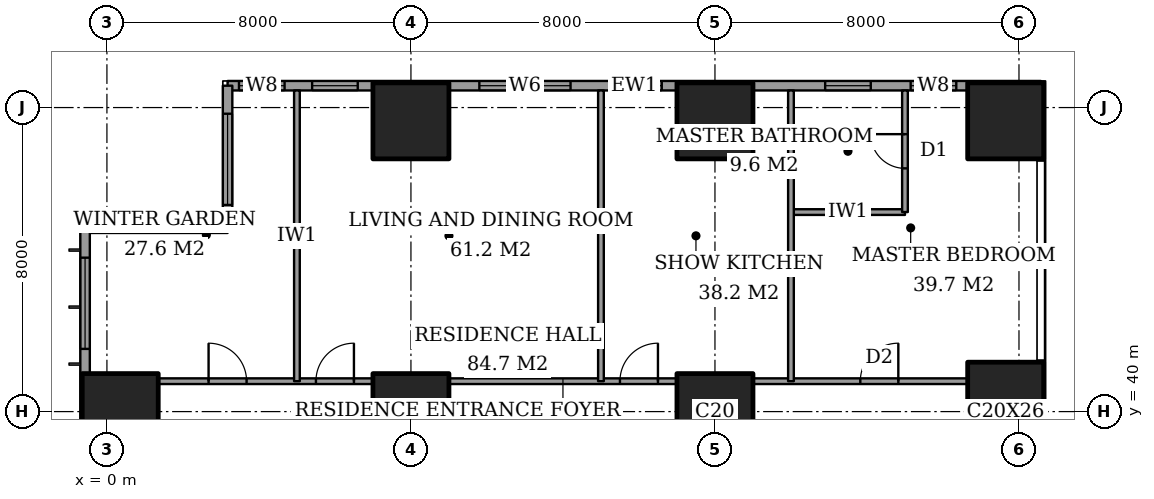
"""IFC4 building model, lengths in metres.
Left out: names, types, materials, properties, quantities, classifications, styles, units other than length and angle.
Written with IfcOpenShell. Run it as: python <this file> out.ifc"""

import sys

from ifc_helpers import new_model, si_unit, direction, frame, frame_2d, origin, origin_2d, place, context, subcontext, project, spatial, rectangle, extrude, element, fill, save


model = new_model("IFC4")
c1 = context("Model", 3, precision=1e-05, world=origin(), true_north=direction((0.0, 1.0)))
c2 = subcontext(c1, "Body", "Model", "MODEL_VIEW")
j1 = project(units=[si_unit("LENGTHUNIT", "METRE"), si_unit("PLANEANGLEUNIT", "RADIAN")], contexts=[c1])
p1 = place(None, origin())
s1 = spatial("IfcSite", under=j1, at=p1, CompositionType="ELEMENT")
p2 = place(p1, origin())
s2 = spatial("IfcBuilding", under=s1, at=p2, CompositionType="ELEMENT")
p3 = place(p2, frame((0.0, 0.0, 47.6)))
s3 = spatial("IfcBuildingStorey", under=s2, at=p3, CompositionType="ELEMENT", Elevation=47.6)
for number, where, z_axis, x_axis in (
    (1, (0.35, 40.0, 0.0), (0.0, 0.0, 1.0), (1.0, 0.0, 0.0)),
    (2, (8.0, 40.0, 0.0), (0.0, 0.0, 1.0), (1.0, 0.0, 0.0)),
    (3, (8.0, 47.65, 0.0), (0.0, 0.0, 1.0), (1.0, 0.0, 0.0)),
    (4, (16.0, 40.0, 0.0), (0.0, 0.0, 1.0), (1.0, 0.0, 0.0)),
    (5, (16.0, 47.65, 0.0), (0.0, 0.0, 1.0), (1.0, 0.0, 0.0)),
):
    element("IfcColumn", number, at=place(p3, frame(where, z_axis=z_axis, x_axis=x_axis)), inside=s3, PredefinedType="COLUMN", context=c2, shape_type="SweptSolid", body=[
        extrude(rectangle(XDim=2.0, YDim=2.0, at=origin_2d()), origin(), (0.0, 0.0, 1.0), 3.6),
    ])
p4 = place(p3, frame((23.65, 40.0, 0.0), z_axis=(0.0, 0.0, 1.0), x_axis=(1.0, 0.0, 0.0)))
e6 = element("IfcColumn", 6, at=p4, inside=s3, PredefinedType="COLUMN", context=c2, shape_type="SweptSolid", body=[
    extrude(rectangle(XDim=2.0, YDim=2.6, at=origin_2d()), origin(), (0.0, 0.0, 1.0), 3.6),
])
p5 = place(p3, frame((23.65, 47.65, 0.0), z_axis=(0.0, 0.0, 1.0), x_axis=(1.0, 0.0, 0.0)))
e7 = element("IfcColumn", 7, at=p5, inside=s3, PredefinedType="COLUMN", context=c2, shape_type="SweptSolid", body=[
    extrude(rectangle(XDim=2.0, YDim=2.0, at=origin_2d()), origin(), (0.0, 0.0, 1.0), 3.6),
])
p6 = place(p3, frame((24.575, 48.575, 0.0), z_axis=(0.0, 0.0, 1.0), x_axis=(-1.0, 0.0, 0.0)))
e8 = element("IfcWall", 8, at=p6, inside=s3, PredefinedType="SOLIDWALL", context=c2, shape_type="SweptSolid", body=[
    extrude(rectangle(XDim=21.4, YDim=0.25, at=frame_2d((10.7, 0.0))), origin(), (0.0, 0.0, 1.0), 3.6),
])
p7 = place(p6, frame((2.225, 0.0, 0.6)))
e9 = element("IfcOpeningElement", 9, at=p7, cuts=e8, PredefinedType="OPENING", context=c2, shape_type="SweptSolid", body=[
    extrude(rectangle(XDim=1.2, YDim=2.0, at=frame_2d((0.6, 1.0))), frame((0.0, 0.135, 0.0), z_axis=(0.0, -1.0, 0.0), x_axis=(1.0, 0.0, 0.0)), (0.0, 0.0, 1.0), 0.27),
])
p8 = place(p6, frame((4.475, 0.0, 0.6)))
e10 = element("IfcOpeningElement", 10, at=p8, cuts=e8, PredefinedType="OPENING", context=c2, shape_type="SweptSolid", body=[
    extrude(rectangle(XDim=1.2, YDim=2.0, at=frame_2d((0.6, 1.0))), frame((0.0, 0.135, 0.0), z_axis=(0.0, -1.0, 0.0), x_axis=(1.0, 0.0, 0.0)), (0.0, 0.0, 1.0), 0.27),
])
p9 = place(p6, frame((9.975, 0.0, 0.6)))
e11 = element("IfcOpeningElement", 11, at=p9, cuts=e8, PredefinedType="OPENING", context=c2, shape_type="SweptSolid", body=[
    extrude(rectangle(XDim=1.2, YDim=2.0, at=frame_2d((0.6, 1.0))), frame((0.0, 0.135, 0.0), z_axis=(0.0, -1.0, 0.0), x_axis=(1.0, 0.0, 0.0)), (0.0, 0.0, 1.0), 0.27),
])
p10 = place(p6, frame((12.375, 0.0, 0.6)))
e12 = element("IfcOpeningElement", 12, at=p10, cuts=e8, PredefinedType="OPENING", context=c2, shape_type="SweptSolid", body=[
    extrude(rectangle(XDim=2.4, YDim=2.0, at=frame_2d((1.2, 1.0))), frame((0.0, 0.135, 0.0), z_axis=(0.0, -1.0, 0.0), x_axis=(1.0, 0.0, 0.0)), (0.0, 0.0, 1.0), 0.27),
])
p11 = place(p6, frame((17.975, 0.0, 0.6)))
e13 = element("IfcOpeningElement", 13, at=p11, cuts=e8, PredefinedType="OPENING", context=c2, shape_type="SweptSolid", body=[
    extrude(rectangle(XDim=1.2, YDim=2.0, at=frame_2d((0.6, 1.0))), frame((0.0, 0.135, 0.0), z_axis=(0.0, -1.0, 0.0), x_axis=(1.0, 0.0, 0.0)), (0.0, 0.0, 1.0), 0.27),
])
p12 = place(p6, frame((19.9, 0.0, 0.6)))
e14 = element("IfcOpeningElement", 14, at=p12, cuts=e8, PredefinedType="OPENING", context=c2, shape_type="SweptSolid", body=[
    extrude(rectangle(XDim=1.2, YDim=2.0, at=frame_2d((0.6, 1.0))), frame((0.0, 0.135, 0.0), z_axis=(0.0, -1.0, 0.0), x_axis=(1.0, 0.0, 0.0)), (0.0, 0.0, 1.0), 0.27),
])
p13 = place(p3, frame((3.175, 48.575, 0.0), z_axis=(0.0, 0.0, 1.0), x_axis=(0.0, -1.0, 0.0)))
e15 = element("IfcWall", 15, at=p13, inside=s3, PredefinedType="SOLIDWALL", context=c2, shape_type="SweptSolid", body=[
    extrude(rectangle(XDim=3.75, YDim=0.25, at=frame_2d((1.875, 0.0))), origin(), (0.0, 0.0, 1.0), 3.6),
])
p14 = place(p13, frame((0.738, 0.0, 0.6)))
e16 = element("IfcOpeningElement", 16, at=p14, cuts=e15, PredefinedType="OPENING", context=c2, shape_type="SweptSolid", body=[
    extrude(rectangle(XDim=2.4, YDim=2.0, at=frame_2d((1.2, 1.0))), frame((0.0, 0.135, 0.0), z_axis=(0.0, -1.0, 0.0), x_axis=(1.0, 0.0, 0.0)), (0.0, 0.0, 1.0), 0.27),
])
p15 = place(p3, frame((3.175, 44.825, 0.0), z_axis=(0.0, 0.0, 1.0), x_axis=(-1.0, 0.0, 0.0)))
e17 = element("IfcWall", 17, at=p15, inside=s3, PredefinedType="SOLIDWALL", context=c2, shape_type="SweptSolid", body=[
    extrude(rectangle(XDim=3.75, YDim=0.25, at=frame_2d((1.875, 0.0))), origin(), (0.0, 0.0, 1.0), 3.6),
])
p16 = place(p15, frame((0.613, 0.0, 0.6)))
e18 = element("IfcOpeningElement", 18, at=p16, cuts=e17, PredefinedType="OPENING", context=c2, shape_type="SweptSolid", body=[
    extrude(rectangle(XDim=2.4, YDim=2.0, at=frame_2d((1.2, 1.0))), frame((0.0, 0.135, 0.0), z_axis=(0.0, -1.0, 0.0), x_axis=(1.0, 0.0, 0.0)), (0.0, 0.0, 1.0), 0.27),
])
p17 = place(p3, frame((-0.575, 44.825, 0.0), z_axis=(0.0, 0.0, 1.0), x_axis=(0.0, -1.0, 0.0)))
e19 = element("IfcWall", 19, at=p17, inside=s3, PredefinedType="SOLIDWALL", context=c2, shape_type="SweptSolid", body=[
    extrude(rectangle(XDim=41.65, YDim=0.25, at=frame_2d((20.825, 0.0))), origin(), (0.0, 0.0, 1.0), 3.6),
])
p18 = place(p17, frame((0.775, 0.0, 0.6)))
e20 = element("IfcOpeningElement", 20, at=p18, cuts=e19, PredefinedType="OPENING", context=c2, shape_type="SweptSolid", body=[
    extrude(rectangle(XDim=2.4, YDim=2.0, at=frame_2d((1.2, 1.0))), frame((0.0, 0.135, 0.0), z_axis=(0.0, -1.0, 0.0), x_axis=(1.0, 0.0, 0.0)), (0.0, 0.0, 1.0), 0.27),
])
p19 = place(p17, frame((6.1, 0.0, 0.6)))
e21 = element("IfcOpeningElement", 21, at=p19, cuts=e19, PredefinedType="OPENING", context=c2, shape_type="SweptSolid", body=[
    extrude(rectangle(XDim=1.2, YDim=2.0, at=frame_2d((0.6, 1.0))), frame((0.0, 0.135, 0.0), z_axis=(0.0, -1.0, 0.0), x_axis=(1.0, 0.0, 0.0)), (0.0, 0.0, 1.0), 0.27),
])
p20 = place(p17, frame((8.425, 0.0, 0.6)))
e22 = element("IfcOpeningElement", 22, at=p20, cuts=e19, PredefinedType="OPENING", context=c2, shape_type="SweptSolid", body=[
    extrude(rectangle(XDim=2.4, YDim=2.0, at=frame_2d((1.2, 1.0))), frame((0.0, 0.135, 0.0), z_axis=(0.0, -1.0, 0.0), x_axis=(1.0, 0.0, 0.0)), (0.0, 0.0, 1.0), 0.27),
])
p21 = place(p17, frame((15.625, 0.0, 0.6)))
e23 = element("IfcOpeningElement", 23, at=p21, cuts=e19, PredefinedType="OPENING", context=c2, shape_type="SweptSolid", body=[
    extrude(rectangle(XDim=2.4, YDim=2.0, at=frame_2d((1.2, 1.0))), frame((0.0, 0.135, 0.0), z_axis=(0.0, -1.0, 0.0), x_axis=(1.0, 0.0, 0.0)), (0.0, 0.0, 1.0), 0.27),
])
p22 = place(p17, frame((23.625, 0.0, 0.6)))
e24 = element("IfcOpeningElement", 24, at=p22, cuts=e19, PredefinedType="OPENING", context=c2, shape_type="SweptSolid", body=[
    extrude(rectangle(XDim=2.4, YDim=2.0, at=frame_2d((1.2, 1.0))), frame((0.0, 0.135, 0.0), z_axis=(0.0, -1.0, 0.0), x_axis=(1.0, 0.0, 0.0)), (0.0, 0.0, 1.0), 0.27),
])
p23 = place(p17, frame((30.825, 0.0, 0.6)))
e25 = element("IfcOpeningElement", 25, at=p23, cuts=e19, PredefinedType="OPENING", context=c2, shape_type="SweptSolid", body=[
    extrude(rectangle(XDim=2.4, YDim=2.0, at=frame_2d((1.2, 1.0))), frame((0.0, 0.135, 0.0), z_axis=(0.0, -1.0, 0.0), x_axis=(1.0, 0.0, 0.0)), (0.0, 0.0, 1.0), 0.27),
])
p24 = place(p17, frame((34.5, 0.0, 0.6)))
e26 = element("IfcOpeningElement", 26, at=p24, cuts=e19, PredefinedType="OPENING", context=c2, shape_type="SweptSolid", body=[
    extrude(rectangle(XDim=1.2, YDim=2.0, at=frame_2d((0.6, 1.0))), frame((0.0, 0.135, 0.0), z_axis=(0.0, -1.0, 0.0), x_axis=(1.0, 0.0, 0.0)), (0.0, 0.0, 1.0), 0.27),
])
p25 = place(p17, frame((38.475, 0.0, 0.6)))
e27 = element("IfcOpeningElement", 27, at=p25, cuts=e19, PredefinedType="OPENING", context=c2, shape_type="SweptSolid", body=[
    extrude(rectangle(XDim=2.4, YDim=2.0, at=frame_2d((1.2, 1.0))), frame((0.0, 0.135, 0.0), z_axis=(0.0, -1.0, 0.0), x_axis=(1.0, 0.0, 0.0)), (0.0, 0.0, 1.0), 0.27),
])
p26 = place(p3, frame((1.35, 40.8, 0.0), z_axis=(0.0, 0.0, 1.0), x_axis=(1.0, 0.0, 0.0)))
e28 = element("IfcWall", 28, at=p26, inside=s3, PredefinedType="PARTITIONING", context=c2, shape_type="SweptSolid", body=[
    extrude(rectangle(XDim=5.65, YDim=0.15, at=frame_2d((2.825, 0.0))), origin(), (0.0, 0.0, 1.0), 3.35),
])
p27 = place(p26, frame((1.325, 0.0, 0.0)))
e29 = element("IfcOpeningElement", 29, at=p27, cuts=e28, PredefinedType="OPENING", context=c2, shape_type="SweptSolid", body=[
    extrude(rectangle(XDim=1.0, YDim=2.1, at=frame_2d((0.5, 1.05))), frame((0.0, 0.085, 0.0), z_axis=(0.0, -1.0, 0.0), x_axis=(1.0, 0.0, 0.0)), (0.0, 0.0, 1.0), 0.17),
])
p28 = place(p26, frame((4.15, 0.0, 0.0)))
e30 = element("IfcOpeningElement", 30, at=p28, cuts=e28, PredefinedType="OPENING", context=c2, shape_type="SweptSolid", body=[
    extrude(rectangle(XDim=1.0, YDim=2.1, at=frame_2d((0.5, 1.05))), frame((0.0, 0.085, 0.0), z_axis=(0.0, -1.0, 0.0), x_axis=(1.0, 0.0, 0.0)), (0.0, 0.0, 1.0), 0.17),
])
p29 = place(p3, frame((9.0, 40.8, 0.0), z_axis=(0.0, 0.0, 1.0), x_axis=(1.0, 0.0, 0.0)))
e31 = element("IfcWall", 31, at=p29, inside=s3, PredefinedType="PARTITIONING", context=c2, shape_type="SweptSolid", body=[
    extrude(rectangle(XDim=6.0, YDim=0.15, at=frame_2d((3.0, 0.0))), origin(), (0.0, 0.0, 1.0), 3.35),
])
p30 = place(p29, frame((4.5, 0.0, 0.0)))
e32 = element("IfcOpeningElement", 32, at=p30, cuts=e31, PredefinedType="OPENING", context=c2, shape_type="SweptSolid", body=[
    extrude(rectangle(XDim=1.0, YDim=2.1, at=frame_2d((0.5, 1.05))), frame((0.0, 0.085, 0.0), z_axis=(0.0, -1.0, 0.0), x_axis=(1.0, 0.0, 0.0)), (0.0, 0.0, 1.0), 0.17),
])
p31 = place(p3, frame((17.0, 40.8, 0.0), z_axis=(0.0, 0.0, 1.0), x_axis=(1.0, 0.0, 0.0)))
e33 = element("IfcWall", 33, at=p31, inside=s3, PredefinedType="PARTITIONING", context=c2, shape_type="SweptSolid", body=[
    extrude(rectangle(XDim=5.65, YDim=0.15, at=frame_2d((2.825, 0.0))), origin(), (0.0, 0.0, 1.0), 3.35),
])
p32 = place(p31, frame((2.825, 0.0, 0.0)))
e34 = element("IfcOpeningElement", 34, at=p32, cuts=e33, PredefinedType="OPENING", context=c2, shape_type="SweptSolid", body=[
    extrude(rectangle(XDim=1.0, YDim=2.1, at=frame_2d((0.5, 1.05))), frame((0.0, 0.085, 0.0), z_axis=(0.0, -1.0, 0.0), x_axis=(1.0, 0.0, 0.0)), (0.0, 0.0, 1.0), 0.17),
])
p33 = place(p3, frame((18.0, 45.25, 0.0), z_axis=(0.0, 0.0, 1.0), x_axis=(1.0, 0.0, 0.0)))
e35 = element("IfcWall", 35, at=p33, inside=s3, PredefinedType="PARTITIONING", context=c2, shape_type="SweptSolid", body=[
    extrude(rectangle(XDim=3.0, YDim=0.15, at=frame_2d((1.5, 0.0))), origin(), (0.0, 0.0, 1.0), 3.35),
])
for number, where, z_axis, x_axis in (
    (36, (5.0, 40.8, 0.0), (0.0, 0.0, 1.0), (0.0, 1.0, 0.0)),
    (37, (13.0, 40.8, 0.0), (0.0, 0.0, 1.0), (0.0, 1.0, 0.0)),
    (38, (18.0, 40.8, 0.0), (0.0, 0.0, 1.0), (0.0, 1.0, 0.0)),
):
    element("IfcWall", number, at=place(p3, frame(where, z_axis=z_axis, x_axis=x_axis)), inside=s3, PredefinedType="PARTITIONING", context=c2, shape_type="SweptSolid", body=[
        extrude(rectangle(XDim=7.65, YDim=0.15, at=frame_2d((3.825, 0.0))), origin(), (0.0, 0.0, 1.0), 3.35),
    ])
p34 = place(p3, frame((21.0, 45.25, 0.0), z_axis=(0.0, 0.0, 1.0), x_axis=(0.0, 1.0, 0.0)))
e39 = element("IfcWall", 39, at=p34, inside=s3, PredefinedType="PARTITIONING", context=c2, shape_type="SweptSolid", body=[
    extrude(rectangle(XDim=3.2, YDim=0.15, at=frame_2d((1.6, 0.0))), origin(), (0.0, 0.0, 1.0), 3.35),
])
p35 = place(p34, frame((1.15, 0.0, 0.0)))
e40 = element("IfcOpeningElement", 40, at=p35, cuts=e39, PredefinedType="OPENING", context=c2, shape_type="SweptSolid", body=[
    extrude(rectangle(XDim=0.9, YDim=2.1, at=frame_2d((0.45, 1.05))), frame((0.0, 0.085, 0.0), z_axis=(0.0, -1.0, 0.0), x_axis=(1.0, 0.0, 0.0)), (0.0, 0.0, 1.0), 0.17),
])
p36 = place(p7, origin())
e41 = element("IfcWindow", 41, at=p36, inside=s3, PartitioningType="SINGLE_PANEL", PredefinedType="WINDOW", context=c2, shape_type="SweptSolid", body=[
    extrude(rectangle(XDim=1.2, YDim=2.0, at=frame_2d((0.6, 1.0))), frame((0.0, 0.03, 0.0), z_axis=(0.0, -1.0, 0.0), x_axis=(1.0, 0.0, 0.0)), (0.0, 0.0, 1.0), 0.06),
])
fill(e9, e41)
p37 = place(p8, origin())
e42 = element("IfcWindow", 42, at=p37, inside=s3, PartitioningType="SINGLE_PANEL", PredefinedType="WINDOW", context=c2, shape_type="SweptSolid", body=[
    extrude(rectangle(XDim=1.2, YDim=2.0, at=frame_2d((0.6, 1.0))), frame((0.0, 0.03, 0.0), z_axis=(0.0, -1.0, 0.0), x_axis=(1.0, 0.0, 0.0)), (0.0, 0.0, 1.0), 0.06),
])
fill(e10, e42)
p38 = place(p9, origin())
e43 = element("IfcWindow", 43, at=p38, inside=s3, PartitioningType="SINGLE_PANEL", PredefinedType="WINDOW", context=c2, shape_type="SweptSolid", body=[
    extrude(rectangle(XDim=1.2, YDim=2.0, at=frame_2d((0.6, 1.0))), frame((0.0, 0.03, 0.0), z_axis=(0.0, -1.0, 0.0), x_axis=(1.0, 0.0, 0.0)), (0.0, 0.0, 1.0), 0.06),
])
fill(e11, e43)
p39 = place(p10, origin())
e44 = element("IfcWindow", 44, at=p39, inside=s3, PartitioningType="SINGLE_PANEL", PredefinedType="WINDOW", context=c2, shape_type="SweptSolid", body=[
    extrude(rectangle(XDim=2.4, YDim=2.0, at=frame_2d((1.2, 1.0))), frame((0.0, 0.03, 0.0), z_axis=(0.0, -1.0, 0.0), x_axis=(1.0, 0.0, 0.0)), (0.0, 0.0, 1.0), 0.06),
])
fill(e12, e44)
p40 = place(p11, origin())
e45 = element("IfcWindow", 45, at=p40, inside=s3, PartitioningType="SINGLE_PANEL", PredefinedType="WINDOW", context=c2, shape_type="SweptSolid", body=[
    extrude(rectangle(XDim=1.2, YDim=2.0, at=frame_2d((0.6, 1.0))), frame((0.0, 0.03, 0.0), z_axis=(0.0, -1.0, 0.0), x_axis=(1.0, 0.0, 0.0)), (0.0, 0.0, 1.0), 0.06),
])
fill(e13, e45)
p41 = place(p12, origin())
e46 = element("IfcWindow", 46, at=p41, inside=s3, PartitioningType="SINGLE_PANEL", PredefinedType="WINDOW", context=c2, shape_type="SweptSolid", body=[
    extrude(rectangle(XDim=1.2, YDim=2.0, at=frame_2d((0.6, 1.0))), frame((0.0, 0.03, 0.0), z_axis=(0.0, -1.0, 0.0), x_axis=(1.0, 0.0, 0.0)), (0.0, 0.0, 1.0), 0.06),
])
fill(e14, e46)
p42 = place(p14, origin())
e47 = element("IfcWindow", 47, at=p42, inside=s3, PartitioningType="SINGLE_PANEL", PredefinedType="WINDOW", context=c2, shape_type="SweptSolid", body=[
    extrude(rectangle(XDim=2.4, YDim=2.0, at=frame_2d((1.2, 1.0))), frame((0.0, 0.03, 0.0), z_axis=(0.0, -1.0, 0.0), x_axis=(1.0, 0.0, 0.0)), (0.0, 0.0, 1.0), 0.06),
])
fill(e16, e47)
p43 = place(p16, origin())
e48 = element("IfcWindow", 48, at=p43, inside=s3, PartitioningType="SINGLE_PANEL", PredefinedType="WINDOW", context=c2, shape_type="SweptSolid", body=[
    extrude(rectangle(XDim=2.4, YDim=2.0, at=frame_2d((1.2, 1.0))), frame((0.0, 0.03, 0.0), z_axis=(0.0, -1.0, 0.0), x_axis=(1.0, 0.0, 0.0)), (0.0, 0.0, 1.0), 0.06),
])
fill(e18, e48)
p44 = place(p18, origin())
e49 = element("IfcWindow", 49, at=p44, inside=s3, PartitioningType="SINGLE_PANEL", PredefinedType="WINDOW", context=c2, shape_type="SweptSolid", body=[
    extrude(rectangle(XDim=2.4, YDim=2.0, at=frame_2d((1.2, 1.0))), frame((0.0, 0.03, 0.0), z_axis=(0.0, -1.0, 0.0), x_axis=(1.0, 0.0, 0.0)), (0.0, 0.0, 1.0), 0.06),
])
fill(e20, e49)
p45 = place(p27, origin())
e50 = element("IfcDoor", 50, at=p45, inside=s3, OperationType="SINGLE_SWING_RIGHT", PredefinedType="DOOR", context=c2, shape_type="SweptSolid", body=[
    extrude(rectangle(XDim=1.0, YDim=2.1, at=frame_2d((0.5, 1.05))), frame((0.0, 0.025, 0.0), z_axis=(0.0, -1.0, 0.0), x_axis=(1.0, 0.0, 0.0)), (0.0, 0.0, 1.0), 0.05),
])
fill(e29, e50)
p46 = place(p28, origin())
e51 = element("IfcDoor", 51, at=p46, inside=s3, OperationType="SINGLE_SWING_LEFT", PredefinedType="DOOR", context=c2, shape_type="SweptSolid", body=[
    extrude(rectangle(XDim=1.0, YDim=2.1, at=frame_2d((0.5, 1.05))), frame((0.0, 0.025, 0.0), z_axis=(0.0, -1.0, 0.0), x_axis=(1.0, 0.0, 0.0)), (0.0, 0.0, 1.0), 0.05),
])
fill(e30, e51)
p47 = place(p30, origin())
e52 = element("IfcDoor", 52, at=p47, inside=s3, OperationType="SINGLE_SWING_LEFT", PredefinedType="DOOR", context=c2, shape_type="SweptSolid", body=[
    extrude(rectangle(XDim=1.0, YDim=2.1, at=frame_2d((0.5, 1.05))), frame((0.0, 0.025, 0.0), z_axis=(0.0, -1.0, 0.0), x_axis=(1.0, 0.0, 0.0)), (0.0, 0.0, 1.0), 0.05),
])
fill(e32, e52)
p48 = place(p35, origin())
e53 = element("IfcDoor", 53, at=p48, inside=s3, OperationType="SINGLE_SWING_LEFT", PredefinedType="DOOR", context=c2, shape_type="SweptSolid", body=[
    extrude(rectangle(XDim=0.9, YDim=2.1, at=frame_2d((0.45, 1.05))), frame((0.0, 0.025, 0.0), z_axis=(0.0, -1.0, 0.0), x_axis=(1.0, 0.0, 0.0)), (0.0, 0.0, 1.0), 0.05),
])
fill(e40, e53)
p49 = place(p32, origin())
e54 = element("IfcDoor", 54, at=p49, inside=s3, OperationType="SINGLE_SWING_LEFT", PredefinedType="DOOR", context=c2, shape_type="SweptSolid", body=[
    extrude(rectangle(XDim=1.0, YDim=2.1, at=frame_2d((0.5, 1.05))), frame((0.0, 0.025, 0.0), z_axis=(0.0, -1.0, 0.0), x_axis=(1.0, 0.0, 0.0)), (0.0, 0.0, 1.0), 0.05),
])
fill(e34, e54)
save(model, sys.argv[1])
